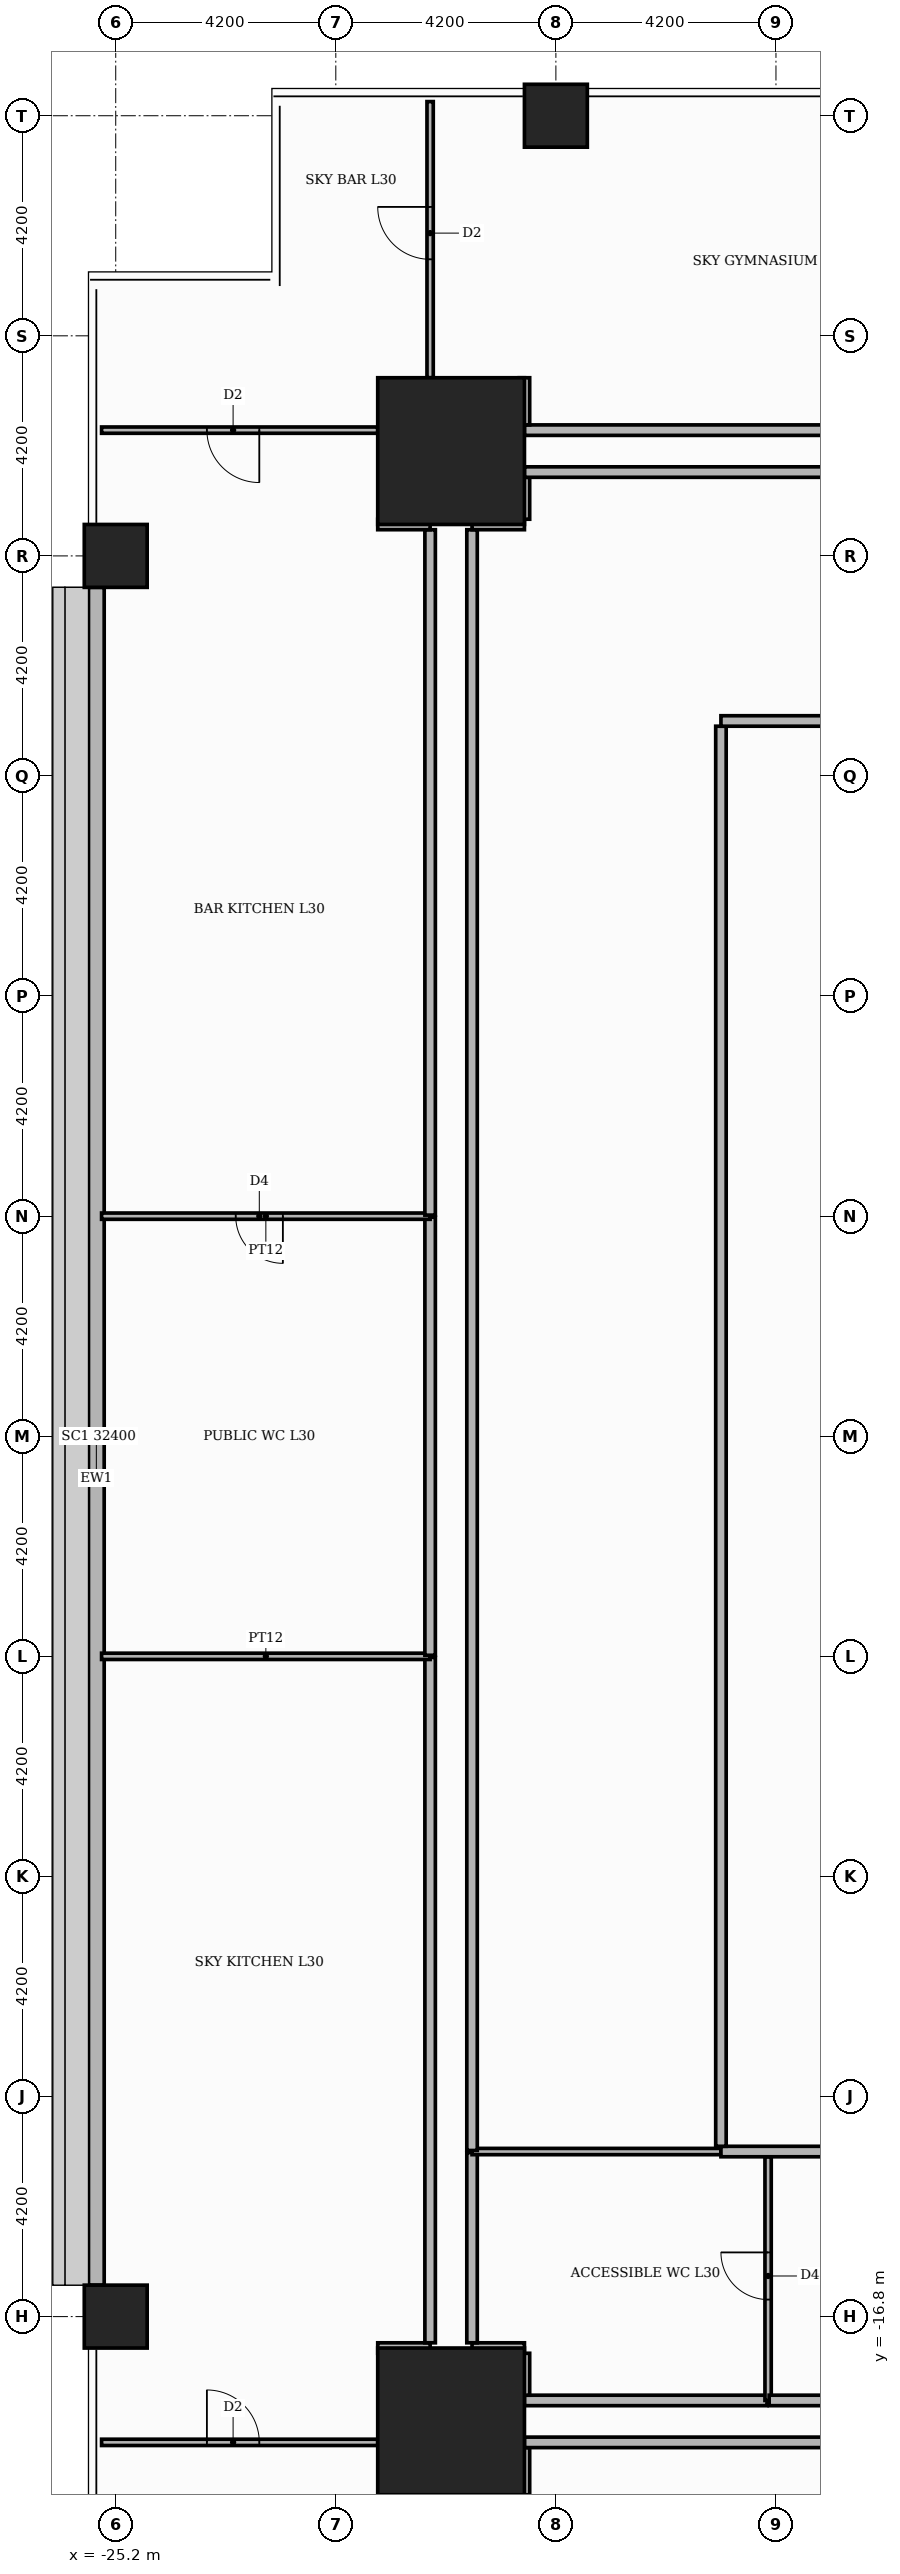
"""IFC4 building model, lengths in metres.
Left out: names, types, materials, properties, quantities, classifications, styles, units other than length and angle.
Written with IfcOpenShell. Run it as: python <this file> out.ifc"""

import sys

from ifc_helpers import new_model, si_unit, direction, frame, frame_2d, origin, origin_2d, place, context, subcontext, project, spatial, rectangle, extrude, element, fill, save


model = new_model("IFC4")
c1 = context("Model", 3, precision=1e-05, world=origin(), true_north=direction((0.0, 1.0)))
c2 = subcontext(c1, "Body", "Model", "MODEL_VIEW")
j1 = project(units=[si_unit("LENGTHUNIT", "METRE"), si_unit("PLANEANGLEUNIT", "RADIAN")], contexts=[c1])
p1 = place(None, origin())
s1 = spatial("IfcSite", under=j1, at=p1, CompositionType="ELEMENT")
p2 = place(p1, origin())
s2 = spatial("IfcBuilding", under=s1, at=p2, CompositionType="ELEMENT")
p3 = place(p2, frame((0.0, 0.0, 126.0)))
s3 = spatial("IfcBuildingStorey", under=s2, at=p3, CompositionType="ELEMENT", Elevation=126.0)
for number, where, z_axis, x_axis in (
    (1, (-18.8, 18.8, 0.0), (0.0, 0.0, 1.0), (1.0, 0.0, 0.0)),
    (2, (-18.8, -18.8, 0.0), (0.0, 0.0, 1.0), (1.0, 0.0, 0.0)),
):
    element("IfcColumn", number, at=place(p3, frame(where, z_axis=z_axis, x_axis=x_axis)), inside=s3, PredefinedType="COLUMN", context=c2, shape_type="SweptSolid", body=[
        extrude(rectangle(XDim=2.8, YDim=2.8, at=origin_2d()), origin(), (0.0, 0.0, 1.0), 7.8),
    ])
for number, where, z_axis, x_axis in (
    (3, (-16.8, 25.2, 0.0), (0.0, 0.0, 1.0), (1.0, 0.0, 0.0)),
    (4, (-25.2, -16.8, 0.0), (0.0, 0.0, 1.0), (1.0, 0.0, 0.0)),
    (5, (-25.2, 16.8, 0.0), (0.0, 0.0, 1.0), (1.0, 0.0, 0.0)),
):
    element("IfcColumn", number, at=place(p3, frame(where, z_axis=z_axis, x_axis=x_axis)), inside=s3, PredefinedType="COLUMN", context=c2, shape_type="SweptSolid", body=[
        extrude(rectangle(XDim=1.2, YDim=1.2, at=origin_2d()), origin(), (0.0, 0.0, 1.0), 7.8),
    ])
p4 = place(p3, frame((-25.57, 16.2, 0.0), z_axis=(0.0, 0.0, 1.0), x_axis=(0.0, -1.0, 0.0)))
e6 = element("IfcWall", 6, at=p4, inside=s3, PredefinedType="STANDARD", context=c2, shape_type="SweptSolid", body=[
    extrude(rectangle(XDim=32.4, YDim=0.3, at=frame_2d((16.2, 0.0))), origin(), (0.0, 0.0, 1.0), 7.38),
])
p5 = place(p3, frame((-17.4, -20.2, 0.0), z_axis=(0.0, 0.0, 1.0), x_axis=(0.0, 1.0, 0.0)))
e7 = element("IfcWall", 7, at=p5, inside=s3, PredefinedType="PARTITIONING", context=c2, shape_type="SweptSolid", body=[
    extrude(rectangle(XDim=0.9, YDim=0.2, at=frame_2d((0.45, 0.0))), origin(), (0.0, 0.0, 1.0), 7.38),
])
p6 = place(p3, frame((-25.47, -19.2, 0.0), z_axis=(0.0, 0.0, 1.0), x_axis=(1.0, 0.0, 0.0)))
e8 = element("IfcWall", 8, at=p6, inside=s3, PredefinedType="PARTITIONING", context=c2, shape_type="SweptSolid", body=[
    extrude(rectangle(XDim=5.27, YDim=0.12, at=frame_2d((2.635, 0.0))), origin(), (0.0, 0.0, 1.0), 7.38),
])
p7 = place(p6, frame((2.01, 0.0, 0.0)))
e9 = element("IfcOpeningElement", 9, at=p7, cuts=e8, PredefinedType="OPENING", context=c2, shape_type="SweptSolid", body=[
    extrude(rectangle(XDim=1.0, YDim=2.1, at=frame_2d((0.5, 1.05))), frame((0.0, 0.07, 0.0), z_axis=(0.0, -1.0, 0.0), x_axis=(1.0, 0.0, 0.0)), (0.0, 0.0, 1.0), 0.14),
])
p8 = place(p3, frame((-17.4, -19.2, 0.0), z_axis=(0.0, 0.0, 1.0), x_axis=(1.0, 0.0, 0.0)))
e10 = element("IfcWall", 10, at=p8, inside=s3, PredefinedType="PARTITIONING", context=c2, shape_type="SweptSolid", body=[
    extrude(rectangle(XDim=34.8, YDim=0.2, at=frame_2d((17.4, 0.0))), origin(), (0.0, 0.0, 1.0), 7.38),
])
p9 = place(p8, frame((16.8, 0.0, 0.0)))
e11 = element("IfcOpeningElement", 11, at=p9, cuts=e10, PredefinedType="OPENING", context=c2, shape_type="SweptSolid", body=[
    extrude(rectangle(XDim=1.2, YDim=2.1, at=frame_2d((0.6, 1.05))), frame((0.0, 0.11, 0.0), z_axis=(0.0, -1.0, 0.0), x_axis=(1.0, 0.0, 0.0)), (0.0, 0.0, 1.0), 0.22),
])
p10 = place(p3, frame((-17.4, -18.4, 0.0), z_axis=(0.0, 0.0, 1.0), x_axis=(1.0, 0.0, 0.0)))
e12 = element("IfcWall", 12, at=p10, inside=s3, PredefinedType="PARTITIONING", context=c2, shape_type="SweptSolid", body=[
    extrude(rectangle(XDim=4.63, YDim=0.2, at=frame_2d((2.315, 0.0))), origin(), (0.0, 0.0, 1.0), 7.38),
])
p11 = place(p3, frame((-12.75, -18.4, 0.0), z_axis=(0.0, 0.0, 1.0), x_axis=(0.0, 1.0, 0.0)))
e13 = element("IfcWall", 13, at=p11, inside=s3, PredefinedType="PARTITIONING", context=c2, shape_type="SweptSolid", body=[
    extrude(rectangle(XDim=4.65, YDim=0.12, at=frame_2d((2.325, 0.0))), origin(), (0.0, 0.0, 1.0), 7.38),
])
p12 = place(p11, frame((1.925, 0.0, 0.0)))
e14 = element("IfcOpeningElement", 14, at=p12, cuts=e13, PredefinedType="OPENING", context=c2, shape_type="SweptSolid", body=[
    extrude(rectangle(XDim=0.9, YDim=2.1, at=frame_2d((0.45, 1.05))), frame((0.0, 0.07, 0.0), z_axis=(0.0, -1.0, 0.0), x_axis=(1.0, 0.0, 0.0)), (0.0, 0.0, 1.0), 0.14),
])
p13 = place(p3, frame((-12.73, -18.4, 0.0), z_axis=(0.0, 0.0, 1.0), x_axis=(1.0, 0.0, 0.0)))
e15 = element("IfcWall", 15, at=p13, inside=s3, PredefinedType="PARTITIONING", context=c2, shape_type="SweptSolid", body=[
    extrude(rectangle(XDim=11.66, YDim=0.2, at=frame_2d((5.83, 0.0))), origin(), (0.0, 0.0, 1.0), 7.38),
])
p14 = place(p3, frame((-17.4, -18.3, 0.0), z_axis=(0.0, 0.0, 1.0), x_axis=(0.0, 1.0, 0.0)))
e16 = element("IfcWall", 16, at=p14, inside=s3, PredefinedType="PARTITIONING", context=c2, shape_type="SweptSolid", body=[
    extrude(rectangle(XDim=0.8, YDim=0.2, at=frame_2d((0.4, 0.0))), origin(), (0.0, 0.0, 1.0), 7.38),
])
for number, where, z_axis, x_axis in (
    (17, (-20.2, -17.4, 0.0), (0.0, 0.0, 1.0), (1.0, 0.0, 0.0)),
    (18, (-18.4, -17.4, 0.0), (0.0, 0.0, 1.0), (1.0, 0.0, 0.0)),
):
    element("IfcWall", number, at=place(p3, frame(where, z_axis=z_axis, x_axis=x_axis)), inside=s3, PredefinedType="PARTITIONING", context=c2, shape_type="SweptSolid", body=[
        extrude(rectangle(XDim=1.0, YDim=0.2, at=frame_2d((0.5, 0.0))), origin(), (0.0, 0.0, 1.0), 7.38),
    ])
p15 = place(p3, frame((-19.2, -17.3, 0.0), z_axis=(0.0, 0.0, 1.0), x_axis=(0.0, 1.0, 0.0)))
e19 = element("IfcWall", 19, at=p15, inside=s3, PredefinedType="PARTITIONING", context=c2, shape_type="SweptSolid", body=[
    extrude(rectangle(XDim=13.08, YDim=0.2, at=frame_2d((6.54, 0.0))), origin(), (0.0, 0.0, 1.0), 7.38),
])
p16 = place(p3, frame((-18.4, -17.3, 0.0), z_axis=(0.0, 0.0, 1.0), x_axis=(0.0, 1.0, 0.0)))
e20 = element("IfcWall", 20, at=p16, inside=s3, PredefinedType="PARTITIONING", context=c2, shape_type="SweptSolid", body=[
    extrude(rectangle(XDim=3.63, YDim=0.2, at=frame_2d((1.815, 0.0))), origin(), (0.0, 0.0, 1.0), 7.38),
])
p17 = place(p3, frame((-18.4, -13.65, 0.0), z_axis=(0.0, 0.0, 1.0), x_axis=(1.0, 0.0, 0.0)))
e21 = element("IfcWall", 21, at=p17, inside=s3, PredefinedType="PARTITIONING", context=c2, shape_type="SweptSolid", body=[
    extrude(rectangle(XDim=4.75, YDim=0.12, at=frame_2d((2.375, 0.0))), origin(), (0.0, 0.0, 1.0), 7.38),
])
p18 = place(p3, frame((-13.65, -13.65, 0.0), z_axis=(0.0, 0.0, 1.0), x_axis=(1.0, 0.0, 0.0)))
e22 = element("IfcWall", 22, at=p18, inside=s3, PredefinedType="PARTITIONING", context=c2, shape_type="SweptSolid", body=[
    extrude(rectangle(XDim=12.6, YDim=0.2, at=frame_2d((6.3, 0.0))), origin(), (0.0, 0.0, 1.0), 7.38),
])
p19 = place(p3, frame((-18.4, -13.63, 0.0), z_axis=(0.0, 0.0, 1.0), x_axis=(0.0, 1.0, 0.0)))
e23 = element("IfcWall", 23, at=p19, inside=s3, PredefinedType="PARTITIONING", context=c2, shape_type="SweptSolid", body=[
    extrude(rectangle(XDim=30.93, YDim=0.2, at=frame_2d((15.465, 0.0))), origin(), (0.0, 0.0, 1.0), 7.38),
])
p20 = place(p3, frame((-13.65, -13.55, 0.0), z_axis=(0.0, 0.0, 1.0), x_axis=(0.0, 1.0, 0.0)))
e24 = element("IfcWall", 24, at=p20, inside=s3, PredefinedType="PARTITIONING", context=c2, shape_type="SweptSolid", body=[
    extrude(rectangle(XDim=27.1, YDim=0.2, at=frame_2d((13.55, 0.0))), origin(), (0.0, 0.0, 1.0), 7.38),
])
p21 = place(p3, frame((-25.47, -4.2, 0.0), z_axis=(0.0, 0.0, 1.0), x_axis=(1.0, 0.0, 0.0)))
e25 = element("IfcWall", 25, at=p21, inside=s3, PredefinedType="PARTITIONING", context=c2, shape_type="SweptSolid", body=[
    extrude(rectangle(XDim=6.27, YDim=0.12, at=frame_2d((3.135, 0.0))), origin(), (0.0, 0.0, 1.0), 7.38),
])
p22 = place(p3, frame((-19.2, -4.18, 0.0), z_axis=(0.0, 0.0, 1.0), x_axis=(0.0, 1.0, 0.0)))
e26 = element("IfcWall", 26, at=p22, inside=s3, PredefinedType="PARTITIONING", context=c2, shape_type="SweptSolid", body=[
    extrude(rectangle(XDim=8.36, YDim=0.2, at=frame_2d((4.18, 0.0))), origin(), (0.0, 0.0, 1.0), 7.38),
])
p23 = place(p3, frame((-25.47, 4.2, 0.0), z_axis=(0.0, 0.0, 1.0), x_axis=(1.0, 0.0, 0.0)))
e27 = element("IfcWall", 27, at=p23, inside=s3, PredefinedType="PARTITIONING", context=c2, shape_type="SweptSolid", body=[
    extrude(rectangle(XDim=6.27, YDim=0.12, at=frame_2d((3.135, 0.0))), origin(), (0.0, 0.0, 1.0), 7.38),
])
p24 = place(p23, frame((2.56, 0.0, 0.0)))
e28 = element("IfcOpeningElement", 28, at=p24, cuts=e27, PredefinedType="OPENING", context=c2, shape_type="SweptSolid", body=[
    extrude(rectangle(XDim=0.9, YDim=2.1, at=frame_2d((0.45, 1.05))), frame((0.0, 0.07, 0.0), z_axis=(0.0, -1.0, 0.0), x_axis=(1.0, 0.0, 0.0)), (0.0, 0.0, 1.0), 0.14),
])
p25 = place(p3, frame((-19.2, 4.22, 0.0), z_axis=(0.0, 0.0, 1.0), x_axis=(0.0, 1.0, 0.0)))
e29 = element("IfcWall", 29, at=p25, inside=s3, PredefinedType="PARTITIONING", context=c2, shape_type="SweptSolid", body=[
    extrude(rectangle(XDim=13.08, YDim=0.2, at=frame_2d((6.54, 0.0))), origin(), (0.0, 0.0, 1.0), 7.38),
])
p26 = place(p3, frame((-13.65, 13.65, 0.0), z_axis=(0.0, 0.0, 1.0), x_axis=(1.0, 0.0, 0.0)))
e30 = element("IfcWall", 30, at=p26, inside=s3, PredefinedType="PARTITIONING", context=c2, shape_type="SweptSolid", body=[
    extrude(rectangle(XDim=27.3, YDim=0.2, at=frame_2d((13.65, 0.0))), origin(), (0.0, 0.0, 1.0), 7.38),
])
p27 = place(p26, frame((13.05, 0.0, 0.0)))
e31 = element("IfcOpeningElement", 31, at=p27, cuts=e30, PredefinedType="OPENING", context=c2, shape_type="SweptSolid", body=[
    extrude(rectangle(XDim=1.2, YDim=2.1, at=frame_2d((0.6, 1.05))), frame((0.0, 0.11, 0.0), z_axis=(0.0, -1.0, 0.0), x_axis=(1.0, 0.0, 0.0)), (0.0, 0.0, 1.0), 0.22),
])
for number, where, z_axis, x_axis in (
    (32, (-20.2, 17.4, 0.0), (0.0, 0.0, 1.0), (1.0, 0.0, 0.0)),
    (33, (-18.4, 17.4, 0.0), (0.0, 0.0, 1.0), (1.0, 0.0, 0.0)),
):
    element("IfcWall", number, at=place(p3, frame(where, z_axis=z_axis, x_axis=x_axis)), inside=s3, PredefinedType="PARTITIONING", context=c2, shape_type="SweptSolid", body=[
        extrude(rectangle(XDim=1.0, YDim=0.2, at=frame_2d((0.5, 0.0))), origin(), (0.0, 0.0, 1.0), 7.38),
    ])
p28 = place(p3, frame((-17.4, 17.5, 0.0), z_axis=(0.0, 0.0, 1.0), x_axis=(0.0, 1.0, 0.0)))
e34 = element("IfcWall", 34, at=p28, inside=s3, PredefinedType="PARTITIONING", context=c2, shape_type="SweptSolid", body=[
    extrude(rectangle(XDim=0.8, YDim=0.2, at=frame_2d((0.4, 0.0))), origin(), (0.0, 0.0, 1.0), 7.38),
])
p29 = place(p3, frame((-17.4, 18.4, 0.0), z_axis=(0.0, 0.0, 1.0), x_axis=(1.0, 0.0, 0.0)))
e35 = element("IfcWall", 35, at=p29, inside=s3, PredefinedType="PARTITIONING", context=c2, shape_type="SweptSolid", body=[
    extrude(rectangle(XDim=34.8, YDim=0.2, at=frame_2d((17.4, 0.0))), origin(), (0.0, 0.0, 1.0), 7.38),
])
p30 = place(p3, frame((-25.47, 19.2, 0.0), z_axis=(0.0, 0.0, 1.0), x_axis=(1.0, 0.0, 0.0)))
e36 = element("IfcWall", 36, at=p30, inside=s3, PredefinedType="PARTITIONING", context=c2, shape_type="SweptSolid", body=[
    extrude(rectangle(XDim=5.27, YDim=0.12, at=frame_2d((2.635, 0.0))), origin(), (0.0, 0.0, 1.0), 7.38),
])
p31 = place(p30, frame((2.01, 0.0, 0.0)))
e37 = element("IfcOpeningElement", 37, at=p31, cuts=e36, PredefinedType="OPENING", context=c2, shape_type="SweptSolid", body=[
    extrude(rectangle(XDim=1.0, YDim=2.1, at=frame_2d((0.5, 1.05))), frame((0.0, 0.07, 0.0), z_axis=(0.0, -1.0, 0.0), x_axis=(1.0, 0.0, 0.0)), (0.0, 0.0, 1.0), 0.14),
])
p32 = place(p3, frame((-17.4, 19.2, 0.0), z_axis=(0.0, 0.0, 1.0), x_axis=(1.0, 0.0, 0.0)))
e38 = element("IfcWall", 38, at=p32, inside=s3, PredefinedType="PARTITIONING", context=c2, shape_type="SweptSolid", body=[
    extrude(rectangle(XDim=34.8, YDim=0.2, at=frame_2d((17.4, 0.0))), origin(), (0.0, 0.0, 1.0), 7.38),
])
p33 = place(p3, frame((-17.4, 19.3, 0.0), z_axis=(0.0, 0.0, 1.0), x_axis=(0.0, 1.0, 0.0)))
e39 = element("IfcWall", 39, at=p33, inside=s3, PredefinedType="PARTITIONING", context=c2, shape_type="SweptSolid", body=[
    extrude(rectangle(XDim=0.9, YDim=0.2, at=frame_2d((0.45, 0.0))), origin(), (0.0, 0.0, 1.0), 7.38),
])
p34 = place(p3, frame((-19.2, 20.2, 0.0), z_axis=(0.0, 0.0, 1.0), x_axis=(0.0, 1.0, 0.0)))
e40 = element("IfcWall", 40, at=p34, inside=s3, PredefinedType="PARTITIONING", context=c2, shape_type="SweptSolid", body=[
    extrude(rectangle(XDim=5.27, YDim=0.12, at=frame_2d((2.635, 0.0))), origin(), (0.0, 0.0, 1.0), 7.38),
])
p35 = place(p34, frame((2.26, 0.0, 0.0)))
e41 = element("IfcOpeningElement", 41, at=p35, cuts=e40, PredefinedType="OPENING", context=c2, shape_type="SweptSolid", body=[
    extrude(rectangle(XDim=1.0, YDim=2.1, at=frame_2d((0.5, 1.05))), frame((0.0, 0.07, 0.0), z_axis=(0.0, -1.0, 0.0), x_axis=(1.0, 0.0, 0.0)), (0.0, 0.0, 1.0), 0.14),
])
p36 = place(p12, origin())
e42 = element("IfcDoor", 42, at=p36, inside=s3, OperationType="SINGLE_SWING_RIGHT", PredefinedType="DOOR", context=c2, shape_type="SweptSolid", body=[
    extrude(rectangle(XDim=0.9, YDim=2.1, at=frame_2d((0.45, 1.05))), frame((0.0, 0.025, 0.0), z_axis=(0.0, -1.0, 0.0), x_axis=(1.0, 0.0, 0.0)), (0.0, 0.0, 1.0), 0.05),
])
fill(e14, e42)
p37 = place(p35, origin())
e43 = element("IfcDoor", 43, at=p37, inside=s3, OperationType="SINGLE_SWING_RIGHT", PredefinedType="DOOR", context=c2, shape_type="SweptSolid", body=[
    extrude(rectangle(XDim=1.0, YDim=2.1, at=frame_2d((0.5, 1.05))), frame((0.0, 0.025, 0.0), z_axis=(0.0, -1.0, 0.0), x_axis=(1.0, 0.0, 0.0)), (0.0, 0.0, 1.0), 0.05),
])
fill(e41, e43)
p38 = place(p31, frame((1.0, 0.0, 0.0), z_axis=(0.0, 0.0, 1.0), x_axis=(-1.0, 0.0, 0.0)))
e44 = element("IfcDoor", 44, at=p38, inside=s3, OperationType="SINGLE_SWING_RIGHT", PredefinedType="DOOR", context=c2, shape_type="SweptSolid", body=[
    extrude(rectangle(XDim=1.0, YDim=2.1, at=frame_2d((0.5, 1.05))), frame((0.0, 0.025, 0.0), z_axis=(0.0, -1.0, 0.0), x_axis=(1.0, 0.0, 0.0)), (0.0, 0.0, 1.0), 0.05),
])
fill(e37, e44)
p39 = place(p24, frame((0.9, 0.0, 0.0), z_axis=(0.0, 0.0, 1.0), x_axis=(-1.0, 0.0, 0.0)))
e45 = element("IfcDoor", 45, at=p39, inside=s3, OperationType="SINGLE_SWING_RIGHT", PredefinedType="DOOR", context=c2, shape_type="SweptSolid", body=[
    extrude(rectangle(XDim=0.9, YDim=2.1, at=frame_2d((0.45, 1.05))), frame((0.0, 0.025, 0.0), z_axis=(0.0, -1.0, 0.0), x_axis=(1.0, 0.0, 0.0)), (0.0, 0.0, 1.0), 0.05),
])
fill(e28, e45)
p40 = place(p7, origin())
e46 = element("IfcDoor", 46, at=p40, inside=s3, OperationType="SINGLE_SWING_LEFT", PredefinedType="DOOR", context=c2, shape_type="SweptSolid", body=[
    extrude(rectangle(XDim=1.0, YDim=2.1, at=frame_2d((0.5, 1.05))), frame((0.0, 0.025, 0.0), z_axis=(0.0, -1.0, 0.0), x_axis=(1.0, 0.0, 0.0)), (0.0, 0.0, 1.0), 0.05),
])
fill(e9, e46)
save(model, sys.argv[1])
